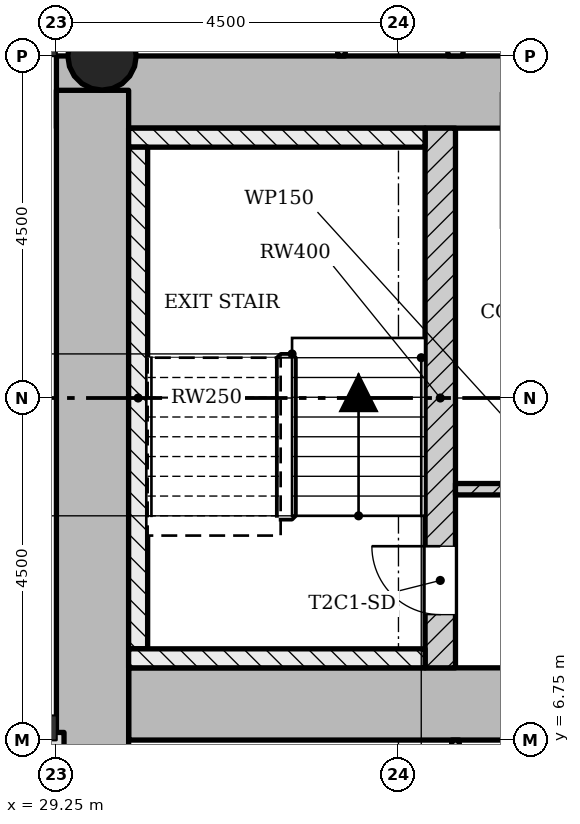
"""IFC4 building model, lengths in metres.
Left out: names, types, materials, properties, quantities, classifications, styles, units other than length and angle.
Written with IfcOpenShell. Run it as: python <this file> out.ifc"""

import sys

from ifc_helpers import new_model, si_unit, direction, frame, frame_2d, origin, origin_2d, place, context, subcontext, project, spatial, rectangle, hollow_circle, extrude, element, fill, save


model = new_model("IFC4")
c1 = context("Model", 3, precision=1e-05, world=origin(), true_north=direction((0.0, 1.0)))
c2 = subcontext(c1, "Body", "Model", "MODEL_VIEW")
j1 = project(units=[si_unit("LENGTHUNIT", "METRE"), si_unit("PLANEANGLEUNIT", "RADIAN")], contexts=[c1])
p1 = place(None, origin())
s1 = spatial("IfcSite", under=j1, at=p1, CompositionType="ELEMENT")
p2 = place(p1, origin())
s2 = spatial("IfcBuilding", under=s1, at=p2, CompositionType="ELEMENT")
p3 = place(p2, frame((0.0, 0.0, 120.8)))
s3 = spatial("IfcBuildingStorey", under=s2, at=p3, CompositionType="ELEMENT", Elevation=120.8)
p4 = place(p3, frame((30.2, 7.225, 0.0), z_axis=(0.0, 0.0, 1.0), x_axis=(1.0, 0.0, 0.0)))
e1 = element("IfcWall", 1, at=p4, inside=s3, PredefinedType="SHEAR", context=c2, shape_type="SweptSolid", body=[
    extrude(rectangle(XDim=12.55, YDim=0.95, at=frame_2d((6.275, 0.0))), origin(), (0.0, 0.0, 1.0), 3.4),
])
p5 = place(p4, frame((4.9, 0.0, 0.0)))
e2 = element("IfcOpeningElement", 2, at=p5, cuts=e1, PredefinedType="OPENING", context=c2, shape_type="SweptSolid", body=[
    extrude(rectangle(XDim=1.8, YDim=2.1, at=frame_2d((0.9, 1.05))), frame((0.0, 0.485, 0.0), z_axis=(0.0, -1.0, 0.0), x_axis=(1.0, 0.0, 0.0)), (0.0, 0.0, 1.0), 0.97),
])
p6 = place(p3, frame((41.8, 15.275, 0.0), z_axis=(0.0, 0.0, 1.0), x_axis=(-1.0, 0.0, 0.0)))
e3 = element("IfcWall", 3, at=p6, inside=s3, PredefinedType="SHEAR", context=c2, shape_type="SweptSolid", body=[
    extrude(rectangle(XDim=12.55, YDim=0.95, at=frame_2d((6.275, 0.0))), origin(), (0.0, 0.0, 1.0), 3.4),
])
p7 = place(p6, frame((4.9, 0.0, 0.0)))
e4 = element("IfcOpeningElement", 4, at=p7, cuts=e3, PredefinedType="OPENING", context=c2, shape_type="SweptSolid", body=[
    extrude(rectangle(XDim=1.8, YDim=2.1, at=frame_2d((0.9, 1.05))), frame((0.0, 0.485, 0.0), z_axis=(0.0, -1.0, 0.0), x_axis=(1.0, 0.0, 0.0)), (0.0, 0.0, 1.0), 0.97),
])
p8 = place(p3, frame((29.725, 15.298, 0.0), z_axis=(0.0, 0.0, 1.0), x_axis=(0.0, -1.0, 0.0)))
e5 = element("IfcWall", 5, at=p8, inside=s3, PredefinedType="SHEAR", context=c2, shape_type="SweptSolid", body=[
    extrude(rectangle(XDim=8.696, YDim=0.95, at=frame_2d((4.348, 0.0))), origin(), (0.0, 0.0, 1.0), 3.4),
])
p9 = place(p3, frame((34.3, 7.7, 0.0), z_axis=(0.0, 0.0, 1.0), x_axis=(0.0, 1.0, 0.0)))
e6 = element("IfcWall", 6, at=p9, inside=s3, PredefinedType="SHEAR", context=c2, shape_type="SweptSolid", body=[
    extrude(rectangle(XDim=7.1, YDim=0.4, at=frame_2d((3.55, 0.0))), origin(), (0.0, 0.0, 1.0), 3.4),
])
p10 = place(p9, frame((0.7, 0.0, 0.0)))
e7 = element("IfcOpeningElement", 7, at=p10, cuts=e6, PredefinedType="OPENING", context=c2, shape_type="SweptSolid", body=[
    extrude(rectangle(XDim=0.9, YDim=2.1, at=frame_2d((0.45, 1.05))), frame((0.0, 0.21, 0.0), z_axis=(0.0, -1.0, 0.0), x_axis=(1.0, 0.0, 0.0)), (0.0, 0.0, 1.0), 0.42),
])
p11 = place(p3, frame((29.85, 15.75, 0.0), z_axis=(0.0, 0.0, 1.0), x_axis=(1.0, 0.0, 0.0)))
e8 = element("IfcColumn", 8, at=p11, inside=s3, PredefinedType="COLUMN", context=c2, shape_type="SweptSolid", body=[
    extrude(hollow_circle(Radius=0.45, WallThickness=0.032, at=origin_2d()), origin(), (0.0, 0.0, 1.0), 3.4),
])
p12 = place(p3, frame((37.5, 10.05, 0.0), z_axis=(0.0, 0.0, 1.0), x_axis=(-1.0, 0.0, 0.0)))
e9 = element("IfcWall", 9, at=p12, inside=s3, PredefinedType="PARTITIONING", context=c2, shape_type="SweptSolid", body=[
    extrude(rectangle(XDim=3.0, YDim=0.15, at=frame_2d((1.5, 0.0))), origin(), (0.0, 0.0, 1.0), 3.0),
])
p13 = place(p12, frame((0.6, 0.0, 0.0)))
e10 = element("IfcOpeningElement", 10, at=p13, cuts=e9, PredefinedType="OPENING", context=c2, shape_type="SweptSolid", body=[
    extrude(rectangle(XDim=1.8, YDim=2.1, at=frame_2d((0.9, 1.05))), frame((0.0, 0.085, 0.0), z_axis=(0.0, -1.0, 0.0), x_axis=(1.0, 0.0, 0.0)), (0.0, 0.0, 1.0), 0.17),
])
p14 = place(p3, frame((34.5, 0.9, 0.0), z_axis=(0.0, 0.0, 1.0), x_axis=(0.0, 1.0, 0.0)))
e11 = element("IfcWall", 11, at=p14, inside=s3, PredefinedType="PARTITIONING", context=c2, shape_type="SweptSolid", body=[
    extrude(rectangle(XDim=5.85, YDim=0.1, at=frame_2d((2.925, 0.0))), origin(), (0.0, 0.0, 1.0), 3.0),
])
p15 = place(p14, frame((2.475, 0.0, 0.0)))
e12 = element("IfcOpeningElement", 12, at=p15, cuts=e11, PredefinedType="OPENING", context=c2, shape_type="SweptSolid", body=[
    extrude(rectangle(XDim=0.9, YDim=2.1, at=frame_2d((0.45, 1.05))), frame((0.0, 0.06, 0.0), z_axis=(0.0, -1.0, 0.0), x_axis=(1.0, 0.0, 0.0)), (0.0, 0.0, 1.0), 0.12),
])
p16 = place(p3, frame((34.5, 15.75, 0.0), z_axis=(0.0, 0.0, 1.0), x_axis=(0.0, 1.0, 0.0)))
e13 = element("IfcWall", 13, at=p16, inside=s3, PredefinedType="SOLIDWALL", context=c2, shape_type="SweptSolid", body=[
    extrude(rectangle(XDim=4.5, YDim=0.2, at=frame_2d((2.25, 0.0))), origin(), (0.0, 0.0, 1.0), 3.0),
])
p17 = place(p16, frame((3.0, 0.0, 0.0)))
e14 = element("IfcOpeningElement", 14, at=p17, cuts=e13, PredefinedType="OPENING", context=c2, shape_type="SweptSolid", body=[
    extrude(rectangle(XDim=0.9, YDim=2.1, at=frame_2d((0.45, 1.05))), frame((0.0, 0.11, 0.0), z_axis=(0.0, -1.0, 0.0), x_axis=(1.0, 0.0, 0.0)), (0.0, 0.0, 1.0), 0.22),
])
p18 = place(p3, frame((33.0, 15.75, 0.0), z_axis=(0.0, 0.0, 1.0), x_axis=(0.0, 1.0, 0.0)))
e15 = element("IfcWall", 15, at=p18, inside=s3, PredefinedType="PARTITIONING", context=c2, shape_type="SweptSolid", body=[
    extrude(rectangle(XDim=2.4, YDim=0.1, at=frame_2d((1.2, 0.0))), origin(), (0.0, 0.0, 1.0), 3.0),
])
p19 = place(p18, frame((0.75, 0.0, 0.0)))
e16 = element("IfcOpeningElement", 16, at=p19, cuts=e15, PredefinedType="OPENING", context=c2, shape_type="SweptSolid", body=[
    extrude(rectangle(XDim=0.9, YDim=2.1, at=frame_2d((0.45, 1.05))), frame((0.0, 0.06, 0.0), z_axis=(0.0, -1.0, 0.0), x_axis=(1.0, 0.0, 0.0)), (0.0, 0.0, 1.0), 0.12),
])
p20 = place(p3, frame((29.25, 0.9, 0.0), z_axis=(0.0, 0.0, 1.0), x_axis=(0.0, 1.0, 0.0)))
e17 = element("IfcWall", 17, at=p20, inside=s3, PredefinedType="SOLIDWALL", context=c2, shape_type="SweptSolid", body=[
    extrude(rectangle(XDim=5.95, YDim=0.2, at=frame_2d((2.975, 0.0))), origin(), (0.0, 0.0, 1.0), 3.0),
])
p21 = place(p3, frame((34.1, 14.675, 0.0), z_axis=(0.0, 0.0, 1.0), x_axis=(-1.0, 0.0, 0.0)))
e18 = element("IfcWall", 18, at=p21, inside=s3, PredefinedType="SHEAR", context=c2, shape_type="SweptSolid", body=[
    extrude(rectangle(XDim=3.9, YDim=0.25, at=frame_2d((1.95, 0.0))), origin(), (0.0, 0.0, 1.0), 3.4),
])
p22 = place(p3, frame((30.325, 7.95, 0.0), z_axis=(0.0, 0.0, 1.0), x_axis=(0.0, 1.0, 0.0)))
e19 = element("IfcWall", 19, at=p22, inside=s3, PredefinedType="SHEAR", context=c2, shape_type="SweptSolid", body=[
    extrude(rectangle(XDim=6.6, YDim=0.25, at=frame_2d((3.3, 0.0))), origin(), (0.0, 0.0, 1.0), 3.4),
])
p23 = place(p3, frame((34.1, 7.825, 0.0), z_axis=(0.0, 0.0, 1.0), x_axis=(-1.0, 0.0, 0.0)))
e20 = element("IfcWall", 20, at=p23, inside=s3, PredefinedType="SHEAR", context=c2, shape_type="SweptSolid", body=[
    extrude(rectangle(XDim=3.9, YDim=0.25, at=frame_2d((1.95, 0.0))), origin(), (0.0, 0.0, 1.0), 3.4),
])
p24 = place(p13, origin())
e21 = element("IfcDoor", 21, at=p24, inside=s3, OperationType="SINGLE_SWING_LEFT", PredefinedType="DOOR", context=c2, shape_type="SweptSolid", body=[
    extrude(rectangle(XDim=1.8, YDim=2.1, at=frame_2d((0.9, 1.05))), frame((0.0, 0.025, 0.0), z_axis=(0.0, -1.0, 0.0), x_axis=(1.0, 0.0, 0.0)), (0.0, 0.0, 1.0), 0.05),
])
fill(e10, e21)
p25 = place(p10, origin())
e22 = element("IfcDoor", 22, at=p25, inside=s3, OperationType="SINGLE_SWING_LEFT", PredefinedType="DOOR", context=c2, shape_type="SweptSolid", body=[
    extrude(rectangle(XDim=0.9, YDim=2.1, at=frame_2d((0.45, 1.05))), frame((0.0, 0.025, 0.0), z_axis=(0.0, -1.0, 0.0), x_axis=(1.0, 0.0, 0.0)), (0.0, 0.0, 1.0), 0.05),
])
fill(e7, e22)
p26 = place(p5, origin())
e23 = element("IfcDoor", 23, at=p26, inside=s3, OperationType="SINGLE_SWING_LEFT", PredefinedType="DOOR", context=c2, shape_type="SweptSolid", body=[
    extrude(rectangle(XDim=1.8, YDim=2.1, at=frame_2d((0.9, 1.05))), frame((0.0, 0.025, 0.0), z_axis=(0.0, -1.0, 0.0), x_axis=(1.0, 0.0, 0.0)), (0.0, 0.0, 1.0), 0.05),
])
fill(e2, e23)
save(model, sys.argv[1])
